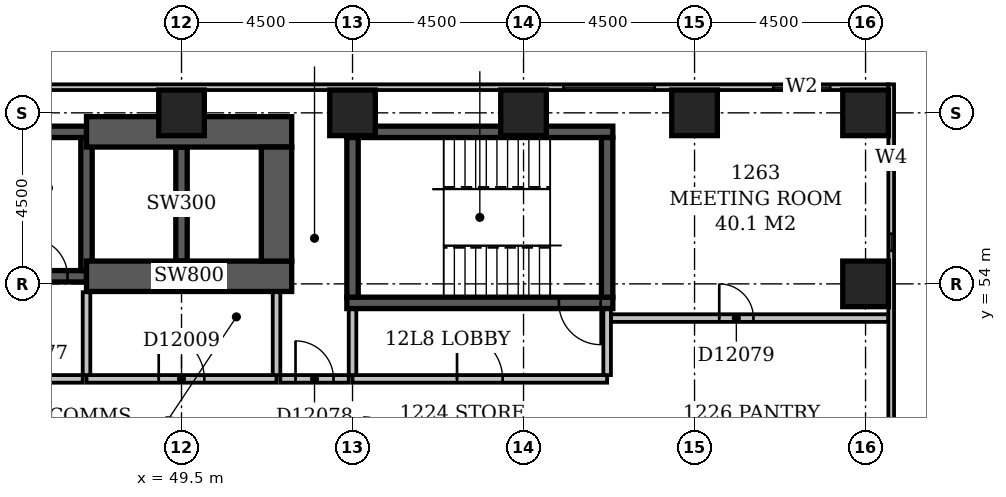
"""IFC4 building model, lengths in metres.
Left out: names, types, materials, properties, quantities, classifications, styles, units other than length and angle.
Written with IfcOpenShell. Run it as: python <this file> out.ifc"""

import sys

from ifc_helpers import new_model, si_unit, direction, frame, frame_2d, origin, origin_2d, place, context, subcontext, project, spatial, rectangle, extrude, element, fill, save


model = new_model("IFC4")
c1 = context("Model", 3, precision=1e-05, world=origin(), true_north=direction((0.0, 1.0)))
c2 = subcontext(c1, "Body", "Model", "MODEL_VIEW")
j1 = project(units=[si_unit("LENGTHUNIT", "METRE"), si_unit("PLANEANGLEUNIT", "RADIAN")], contexts=[c1])
p1 = place(None, origin())
s1 = spatial("IfcSite", under=j1, at=p1, CompositionType="ELEMENT")
p2 = place(p1, origin())
s2 = spatial("IfcBuilding", under=s1, at=p2, CompositionType="ELEMENT")
p3 = place(p2, frame((0.0, 0.0, 54.2)))
s3 = spatial("IfcBuildingStorey", under=s2, at=p3, CompositionType="ELEMENT", Elevation=54.2)
p4 = place(p3, frame((44.85, 54.2, -0.3), z_axis=(0.0, 0.0, 1.0), x_axis=(1.0, 0.0, 0.0)))
e1 = element("IfcWall", 1, at=p4, inside=s3, PredefinedType="SHEAR", context=c2, shape_type="SweptSolid", body=[
    extrude(rectangle(XDim=2.15, YDim=0.3, at=frame_2d((1.075, 0.0))), origin(), (0.0, 0.0, 1.0), 3.6),
])
p5 = place(p4, frame((0.65, 0.0, 0.3)))
e2 = element("IfcOpeningElement", 2, at=p5, cuts=e1, PredefinedType="OPENING", context=c2, shape_type="SweptSolid", body=[
    extrude(rectangle(XDim=1.0, YDim=2.1, at=frame_2d((0.5, 1.05))), frame((0.0, 0.162, 0.0), z_axis=(0.0, -1.0, 0.0), x_axis=(1.0, 0.0, 0.0)), (0.0, 0.0, 1.0), 0.324),
])
p6 = place(p3, frame((44.85, 58.0, -0.3), z_axis=(0.0, 0.0, 1.0), x_axis=(1.0, 0.0, 0.0)))
e3 = element("IfcWall", 3, at=p6, inside=s3, PredefinedType="SHEAR", context=c2, shape_type="SweptSolid", body=[
    extrude(rectangle(XDim=2.15, YDim=0.3, at=frame_2d((1.075, 0.0))), origin(), (0.0, 0.0, 1.0), 3.6),
])
p7 = place(p3, frame((47.0, 54.2, -0.3), z_axis=(0.0, 0.0, 1.0), x_axis=(1.0, 0.0, 0.0)))
e4 = element("IfcWall", 4, at=p7, inside=s3, PredefinedType="SHEAR", context=c2, shape_type="SweptSolid", body=[
    extrude(rectangle(XDim=5.4, YDim=0.8, at=frame_2d((2.7, 0.0))), origin(), (0.0, 0.0, 1.0), 3.6),
])
p8 = place(p3, frame((47.0, 54.35, -0.3), z_axis=(0.0, 0.0, 1.0), x_axis=(0.0, 1.0, 0.0)))
e5 = element("IfcWall", 5, at=p8, inside=s3, PredefinedType="SHEAR", context=c2, shape_type="SweptSolid", body=[
    extrude(rectangle(XDim=3.5, YDim=0.3, at=frame_2d((1.75, 0.0))), origin(), (0.0, 0.0, 1.0), 3.6),
])
p9 = place(p3, frame((47.0, 58.0, -0.3), z_axis=(0.0, 0.0, 1.0), x_axis=(1.0, 0.0, 0.0)))
e6 = element("IfcWall", 6, at=p9, inside=s3, PredefinedType="SHEAR", context=c2, shape_type="SweptSolid", body=[
    extrude(rectangle(XDim=5.4, YDim=0.8, at=frame_2d((2.7, 0.0))), origin(), (0.0, 0.0, 1.0), 3.6),
])
p10 = place(p3, frame((49.5, 54.6, -0.3), z_axis=(0.0, 0.0, 1.0), x_axis=(0.0, 1.0, 0.0)))
e7 = element("IfcWall", 7, at=p10, inside=s3, PredefinedType="SHEAR", context=c2, shape_type="SweptSolid", body=[
    extrude(rectangle(XDim=3.0, YDim=0.3, at=frame_2d((1.5, 0.0))), origin(), (0.0, 0.0, 1.0), 3.6),
])
p11 = place(p3, frame((52.0, 54.6, -0.3), z_axis=(0.0, 0.0, 1.0), x_axis=(0.0, 1.0, 0.0)))
e8 = element("IfcWall", 8, at=p11, inside=s3, PredefinedType="SHEAR", context=c2, shape_type="SweptSolid", body=[
    extrude(rectangle(XDim=3.0, YDim=0.8, at=frame_2d((1.5, 0.0))), origin(), (0.0, 0.0, 1.0), 3.6),
])
p12 = place(p3, frame((53.85, 53.5, -0.3), z_axis=(0.0, 0.0, 1.0), x_axis=(1.0, 0.0, 0.0)))
e9 = element("IfcWall", 9, at=p12, inside=s3, PredefinedType="SHEAR", context=c2, shape_type="SweptSolid", body=[
    extrude(rectangle(XDim=7.0, YDim=0.3, at=frame_2d((3.5, 0.0))), origin(), (0.0, 0.0, 1.0), 3.6),
])
p13 = place(p12, frame((5.58, 0.0, 0.3)))
e10 = element("IfcOpeningElement", 10, at=p13, cuts=e9, PredefinedType="OPENING", context=c2, shape_type="SweptSolid", body=[
    extrude(rectangle(XDim=1.1, YDim=2.1, at=frame_2d((0.55, 1.05))), frame((0.0, 0.162, 0.0), z_axis=(0.0, -1.0, 0.0), x_axis=(1.0, 0.0, 0.0)), (0.0, 0.0, 1.0), 0.324),
])
p14 = place(p3, frame((53.85, 58.0, -0.3), z_axis=(0.0, 0.0, 1.0), x_axis=(1.0, 0.0, 0.0)))
e11 = element("IfcWall", 11, at=p14, inside=s3, PredefinedType="SHEAR", context=c2, shape_type="SweptSolid", body=[
    extrude(rectangle(XDim=7.0, YDim=0.3, at=frame_2d((3.5, 0.0))), origin(), (0.0, 0.0, 1.0), 3.6),
])
for number, where, z_axis, x_axis in (
    (12, (54.0, 53.65, -0.3), (0.0, 0.0, 1.0), (0.0, 1.0, 0.0)),
    (13, (60.7, 53.65, -0.3), (0.0, 0.0, 1.0), (0.0, 1.0, 0.0)),
):
    element("IfcWall", number, at=place(p3, frame(where, z_axis=z_axis, x_axis=x_axis)), inside=s3, PredefinedType="SHEAR", context=c2, shape_type="SweptSolid", body=[
        extrude(rectangle(XDim=4.2, YDim=0.3, at=frame_2d((2.1, 0.0))), origin(), (0.0, 0.0, 1.0), 3.6),
    ])
for number, where, z_axis, x_axis in (
    (14, (67.5, 54.0, -0.3), (0.0, 0.0, 1.0), (1.0, 0.0, 0.0)),
    (15, (49.5, 58.5, -0.3), (0.0, 0.0, 1.0), (1.0, 0.0, 0.0)),
    (16, (54.0, 58.5, -0.3), (0.0, 0.0, 1.0), (1.0, 0.0, 0.0)),
    (17, (58.5, 58.5, -0.3), (0.0, 0.0, 1.0), (1.0, 0.0, 0.0)),
    (18, (63.0, 58.5, -0.3), (0.0, 0.0, 1.0), (1.0, 0.0, 0.0)),
    (19, (67.5, 58.5, -0.3), (0.0, 0.0, 1.0), (1.0, 0.0, 0.0)),
):
    element("IfcColumn", number, at=place(p3, frame(where, z_axis=z_axis, x_axis=x_axis)), inside=s3, PredefinedType="COLUMN", context=c2, shape_type="SweptSolid", body=[
        extrude(rectangle(XDim=1.2, YDim=1.2, at=origin_2d()), origin(), (0.0, 0.0, 1.0), 3.6),
    ])
p15 = place(p3, frame((68.175, 35.4, 0.0), z_axis=(0.0, 0.0, 1.0), x_axis=(0.0, 1.0, 0.0)))
e20 = element("IfcWall", 20, at=p15, inside=s3, PredefinedType="STANDARD", context=c2, shape_type="SweptSolid", body=[
    extrude(rectangle(XDim=23.85, YDim=0.15, at=frame_2d((11.925, 0.0))), origin(), (0.0, 0.0, 1.0), 2.7),
])
p16 = place(p15, frame((1.53, 0.0, 0.6)))
e21 = element("IfcOpeningElement", 21, at=p16, cuts=e20, PredefinedType="OPENING", context=c2, shape_type="SweptSolid", body=[
    extrude(rectangle(XDim=1.5, YDim=1.8, at=frame_2d((0.75, 0.9))), frame((0.0, 0.087, 0.0), z_axis=(0.0, -1.0, 0.0), x_axis=(1.0, 0.0, 0.0)), (0.0, 0.0, 1.0), 0.174),
])
p17 = place(p15, frame((10.65, 0.0, 0.6)))
e22 = element("IfcOpeningElement", 22, at=p17, cuts=e20, PredefinedType="OPENING", context=c2, shape_type="SweptSolid", body=[
    extrude(rectangle(XDim=2.4, YDim=1.8, at=frame_2d((1.2, 0.9))), frame((0.0, 0.087, 0.0), z_axis=(0.0, -1.0, 0.0), x_axis=(1.0, 0.0, 0.0)), (0.0, 0.0, 1.0), 0.174),
])
p18 = place(p15, frame((19.47, 0.0, 0.6)))
e23 = element("IfcOpeningElement", 23, at=p18, cuts=e20, PredefinedType="OPENING", context=c2, shape_type="SweptSolid", body=[
    extrude(rectangle(XDim=0.45, YDim=1.8, at=frame_2d((0.225, 0.9))), frame((0.0, 0.087, 0.0), z_axis=(0.0, -1.0, 0.0), x_axis=(1.0, 0.0, 0.0)), (0.0, 0.0, 1.0), 0.174),
])
p19 = place(p15, frame((21.601, 0.0, 0.6)))
e24 = element("IfcOpeningElement", 24, at=p19, cuts=e20, PredefinedType="OPENING", context=c2, shape_type="SweptSolid", body=[
    extrude(rectangle(XDim=0.6, YDim=1.8, at=frame_2d((0.3, 0.9))), frame((0.0, 0.087, 0.0), z_axis=(0.0, -1.0, 0.0), x_axis=(1.0, 0.0, 0.0)), (0.0, 0.0, 1.0), 0.174),
])
p20 = place(p3, frame((68.1, 59.175, 0.0), z_axis=(0.0, 0.0, 1.0), x_axis=(-1.0, 0.0, 0.0)))
e25 = element("IfcWall", 25, at=p20, inside=s3, PredefinedType="STANDARD", context=c2, shape_type="SweptSolid", body=[
    extrude(rectangle(XDim=68.85, YDim=0.15, at=frame_2d((34.425, 0.0))), origin(), (0.0, 0.0, 1.0), 2.7),
])
p21 = place(p20, frame((1.53, 0.0, 0.6)))
e26 = element("IfcOpeningElement", 26, at=p21, cuts=e25, PredefinedType="OPENING", context=c2, shape_type="SweptSolid", body=[
    extrude(rectangle(XDim=1.5, YDim=1.8, at=frame_2d((0.75, 0.9))), frame((0.0, 0.087, 0.0), z_axis=(0.0, -1.0, 0.0), x_axis=(1.0, 0.0, 0.0)), (0.0, 0.0, 1.0), 0.174),
])
p22 = place(p20, frame((6.15, 0.0, 0.6)))
e27 = element("IfcOpeningElement", 27, at=p22, cuts=e25, PredefinedType="OPENING", context=c2, shape_type="SweptSolid", body=[
    extrude(rectangle(XDim=2.4, YDim=1.8, at=frame_2d((1.2, 0.9))), frame((0.0, 0.087, 0.0), z_axis=(0.0, -1.0, 0.0), x_axis=(1.0, 0.0, 0.0)), (0.0, 0.0, 1.0), 0.174),
])
p23 = place(p20, frame((37.65, 0.0, 0.6)))
e28 = element("IfcOpeningElement", 28, at=p23, cuts=e25, PredefinedType="OPENING", context=c2, shape_type="SweptSolid", body=[
    extrude(rectangle(XDim=2.4, YDim=1.8, at=frame_2d((1.2, 0.9))), frame((0.0, 0.087, 0.0), z_axis=(0.0, -1.0, 0.0), x_axis=(1.0, 0.0, 0.0)), (0.0, 0.0, 1.0), 0.174),
])
p24 = place(p3, frame((47.0, 51.5, 0.0), z_axis=(0.0, 0.0, 1.0), x_axis=(1.0, 0.0, 0.0)))
e29 = element("IfcWall", 29, at=p24, inside=s3, PredefinedType="PARTITIONING", context=c2, shape_type="SweptSolid", body=[
    extrude(rectangle(XDim=5.0, YDim=0.2, at=frame_2d((2.5, 0.0))), origin(), (0.0, 0.0, 1.0), 3.3),
])
p25 = place(p24, frame((1.9, 0.0, 0.0)))
e30 = element("IfcOpeningElement", 30, at=p25, cuts=e29, PredefinedType="OPENING", context=c2, shape_type="SweptSolid", body=[
    extrude(rectangle(XDim=1.2, YDim=2.1, at=frame_2d((0.6, 1.05))), frame((0.0, 0.112, 0.0), z_axis=(0.0, -1.0, 0.0), x_axis=(1.0, 0.0, 0.0)), (0.0, 0.0, 1.0), 0.224),
])
for number, where, z_axis, x_axis in (
    (31, (52.0, 51.6, 0.0), (0.0, 0.0, 1.0), (0.0, 1.0, 0.0)),
    (32, (47.0, 51.6, 0.0), (0.0, 0.0, 1.0), (0.0, 1.0, 0.0)),
):
    element("IfcWall", number, at=place(p3, frame(where, z_axis=z_axis, x_axis=x_axis)), inside=s3, PredefinedType="PARTITIONING", context=c2, shape_type="SweptSolid", body=[
        extrude(rectangle(XDim=2.18, YDim=0.2, at=frame_2d((1.09, 0.0))), origin(), (0.0, 0.0, 1.0), 3.3),
    ])
p26 = place(p3, frame((54.0, 51.5, 0.0), z_axis=(0.0, 0.0, 1.0), x_axis=(1.0, 0.0, 0.0)))
e33 = element("IfcWall", 33, at=p26, inside=s3, PredefinedType="PARTITIONING", context=c2, shape_type="SweptSolid", body=[
    extrude(rectangle(XDim=6.7, YDim=0.2, at=frame_2d((3.35, 0.0))), origin(), (0.0, 0.0, 1.0), 3.3),
])
p27 = place(p26, frame((2.75, 0.0, 0.0)))
e34 = element("IfcOpeningElement", 34, at=p27, cuts=e33, PredefinedType="OPENING", context=c2, shape_type="SweptSolid", body=[
    extrude(rectangle(XDim=1.2, YDim=2.1, at=frame_2d((0.6, 1.05))), frame((0.0, 0.112, 0.0), z_axis=(0.0, -1.0, 0.0), x_axis=(1.0, 0.0, 0.0)), (0.0, 0.0, 1.0), 0.224),
])
p28 = place(p3, frame((60.7, 51.6, 0.0), z_axis=(0.0, 0.0, 1.0), x_axis=(0.0, 1.0, 0.0)))
e35 = element("IfcWall", 35, at=p28, inside=s3, PredefinedType="PARTITIONING", context=c2, shape_type="SweptSolid", body=[
    extrude(rectangle(XDim=1.73, YDim=0.2, at=frame_2d((0.865, 0.0))), origin(), (0.0, 0.0, 1.0), 3.3),
])
p29 = place(p3, frame((54.0, 51.6, 0.0), z_axis=(0.0, 0.0, 1.0), x_axis=(0.0, 1.0, 0.0)))
e36 = element("IfcWall", 36, at=p29, inside=s3, PredefinedType="PARTITIONING", context=c2, shape_type="SweptSolid", body=[
    extrude(rectangle(XDim=1.73, YDim=0.2, at=frame_2d((0.865, 0.0))), origin(), (0.0, 0.0, 1.0), 2.6),
])
p30 = place(p3, frame((44.1, 51.5, 0.0), z_axis=(0.0, 0.0, 1.0), x_axis=(1.0, 0.0, 0.0)))
e37 = element("IfcWall", 37, at=p30, inside=s3, PredefinedType="PARTITIONING", context=c2, shape_type="SweptSolid", body=[
    extrude(rectangle(XDim=2.8, YDim=0.2, at=frame_2d((1.4, 0.0))), origin(), (0.0, 0.0, 1.0), 3.3),
])
p31 = place(p30, frame((0.9, 0.0, 0.0)))
e38 = element("IfcOpeningElement", 38, at=p31, cuts=e37, PredefinedType="OPENING", context=c2, shape_type="SweptSolid", body=[
    extrude(rectangle(XDim=1.0, YDim=2.1, at=frame_2d((0.5, 1.05))), frame((0.0, 0.112, 0.0), z_axis=(0.0, -1.0, 0.0), x_axis=(1.0, 0.0, 0.0)), (0.0, 0.0, 1.0), 0.224),
])
p32 = place(p3, frame((52.1, 51.5, 0.0), z_axis=(0.0, 0.0, 1.0), x_axis=(1.0, 0.0, 0.0)))
e39 = element("IfcWall", 39, at=p32, inside=s3, PredefinedType="PARTITIONING", context=c2, shape_type="SweptSolid", body=[
    extrude(rectangle(XDim=1.8, YDim=0.2, at=frame_2d((0.9, 0.0))), origin(), (0.0, 0.0, 1.0), 3.3),
])
p33 = place(p32, frame((0.4, 0.0, 0.0)))
e40 = element("IfcOpeningElement", 40, at=p33, cuts=e39, PredefinedType="OPENING", context=c2, shape_type="SweptSolid", body=[
    extrude(rectangle(XDim=1.0, YDim=2.1, at=frame_2d((0.5, 1.05))), frame((0.0, 0.112, 0.0), z_axis=(0.0, -1.0, 0.0), x_axis=(1.0, 0.0, 0.0)), (0.0, 0.0, 1.0), 0.224),
])
p34 = place(p3, frame((60.8, 53.1, 0.0), z_axis=(0.0, 0.0, 1.0), x_axis=(1.0, 0.0, 0.0)))
e41 = element("IfcWall", 41, at=p34, inside=s3, PredefinedType="PARTITIONING", context=c2, shape_type="SweptSolid", body=[
    extrude(rectangle(XDim=7.3, YDim=0.2, at=frame_2d((3.65, 0.0))), origin(), (0.0, 0.0, 1.0), 3.3),
])
p35 = place(p34, frame((2.85, 0.0, 0.0)))
e42 = element("IfcOpeningElement", 42, at=p35, cuts=e41, PredefinedType="OPENING", context=c2, shape_type="SweptSolid", body=[
    extrude(rectangle(XDim=0.9, YDim=2.1, at=frame_2d((0.45, 1.05))), frame((0.0, 0.112, 0.0), z_axis=(0.0, -1.0, 0.0), x_axis=(1.0, 0.0, 0.0)), (0.0, 0.0, 1.0), 0.224),
])
p36 = place(p18, origin())
e43 = element("IfcWindow", 43, at=p36, inside=s3, PartitioningType="SINGLE_PANEL", PredefinedType="WINDOW", context=c2, shape_type="SweptSolid", body=[
    extrude(rectangle(XDim=0.45, YDim=1.8, at=frame_2d((0.225, 0.9))), frame((0.0, 0.03, 0.0), z_axis=(0.0, -1.0, 0.0), x_axis=(1.0, 0.0, 0.0)), (0.0, 0.0, 1.0), 0.06),
])
fill(e23, e43)
p37 = place(p19, origin())
e44 = element("IfcWindow", 44, at=p37, inside=s3, PartitioningType="SINGLE_PANEL", PredefinedType="WINDOW", context=c2, shape_type="SweptSolid", body=[
    extrude(rectangle(XDim=0.6, YDim=1.8, at=frame_2d((0.3, 0.9))), frame((0.0, 0.03, 0.0), z_axis=(0.0, -1.0, 0.0), x_axis=(1.0, 0.0, 0.0)), (0.0, 0.0, 1.0), 0.06),
])
fill(e24, e44)
p38 = place(p21, origin())
e45 = element("IfcWindow", 45, at=p38, inside=s3, PartitioningType="SINGLE_PANEL", PredefinedType="WINDOW", context=c2, shape_type="SweptSolid", body=[
    extrude(rectangle(XDim=1.5, YDim=1.8, at=frame_2d((0.75, 0.9))), frame((0.0, 0.03, 0.0), z_axis=(0.0, -1.0, 0.0), x_axis=(1.0, 0.0, 0.0)), (0.0, 0.0, 1.0), 0.06),
])
fill(e26, e45)
p39 = place(p22, origin())
e46 = element("IfcWindow", 46, at=p39, inside=s3, PartitioningType="SINGLE_PANEL", PredefinedType="WINDOW", context=c2, shape_type="SweptSolid", body=[
    extrude(rectangle(XDim=2.4, YDim=1.8, at=frame_2d((1.2, 0.9))), frame((0.0, 0.03, 0.0), z_axis=(0.0, -1.0, 0.0), x_axis=(1.0, 0.0, 0.0)), (0.0, 0.0, 1.0), 0.06),
])
fill(e27, e46)
p40 = place(p27, origin())
e47 = element("IfcDoor", 47, at=p40, inside=s3, OperationType="SINGLE_SWING_LEFT", PredefinedType="DOOR", context=c2, shape_type="SweptSolid", body=[
    extrude(rectangle(XDim=1.2, YDim=2.1, at=frame_2d((0.6, 1.05))), frame((0.0, 0.025, 0.0), z_axis=(0.0, -1.0, 0.0), x_axis=(1.0, 0.0, 0.0)), (0.0, 0.0, 1.0), 0.05),
])
fill(e34, e47)
p41 = place(p25, origin())
e48 = element("IfcDoor", 48, at=p41, inside=s3, OperationType="SINGLE_SWING_LEFT", PredefinedType="DOOR", context=c2, shape_type="SweptSolid", body=[
    extrude(rectangle(XDim=1.2, YDim=2.1, at=frame_2d((0.6, 1.05))), frame((0.0, 0.025, 0.0), z_axis=(0.0, -1.0, 0.0), x_axis=(1.0, 0.0, 0.0)), (0.0, 0.0, 1.0), 0.05),
])
fill(e30, e48)
p42 = place(p5, origin())
e49 = element("IfcDoor", 49, at=p42, inside=s3, OperationType="SINGLE_SWING_LEFT", PredefinedType="DOOR", context=c2, shape_type="SweptSolid", body=[
    extrude(rectangle(XDim=1.0, YDim=2.1, at=frame_2d((0.5, 1.05))), frame((0.0, 0.025, 0.0), z_axis=(0.0, -1.0, 0.0), x_axis=(1.0, 0.0, 0.0)), (0.0, 0.0, 1.0), 0.05),
])
fill(e2, e49)
p43 = place(p13, origin())
e50 = element("IfcDoor", 50, at=p43, inside=s3, OperationType="SINGLE_SWING_RIGHT", PredefinedType="DOOR", context=c2, shape_type="SweptSolid", body=[
    extrude(rectangle(XDim=1.1, YDim=2.1, at=frame_2d((0.55, 1.05))), frame((0.0, 0.025, 0.0), z_axis=(0.0, -1.0, 0.0), x_axis=(1.0, 0.0, 0.0)), (0.0, 0.0, 1.0), 0.05),
])
fill(e10, e50)
p44 = place(p33, origin())
e51 = element("IfcDoor", 51, at=p44, inside=s3, OperationType="SINGLE_SWING_LEFT", PredefinedType="DOOR", context=c2, shape_type="SweptSolid", body=[
    extrude(rectangle(XDim=1.0, YDim=2.1, at=frame_2d((0.5, 1.05))), frame((0.0, 0.025, 0.0), z_axis=(0.0, -1.0, 0.0), x_axis=(1.0, 0.0, 0.0)), (0.0, 0.0, 1.0), 0.05),
])
fill(e40, e51)
p45 = place(p35, origin())
e52 = element("IfcDoor", 52, at=p45, inside=s3, OperationType="SINGLE_SWING_LEFT", PredefinedType="DOOR", context=c2, shape_type="SweptSolid", body=[
    extrude(rectangle(XDim=0.9, YDim=2.1, at=frame_2d((0.45, 1.05))), frame((0.0, 0.025, 0.0), z_axis=(0.0, -1.0, 0.0), x_axis=(1.0, 0.0, 0.0)), (0.0, 0.0, 1.0), 0.05),
])
fill(e42, e52)
save(model, sys.argv[1])
